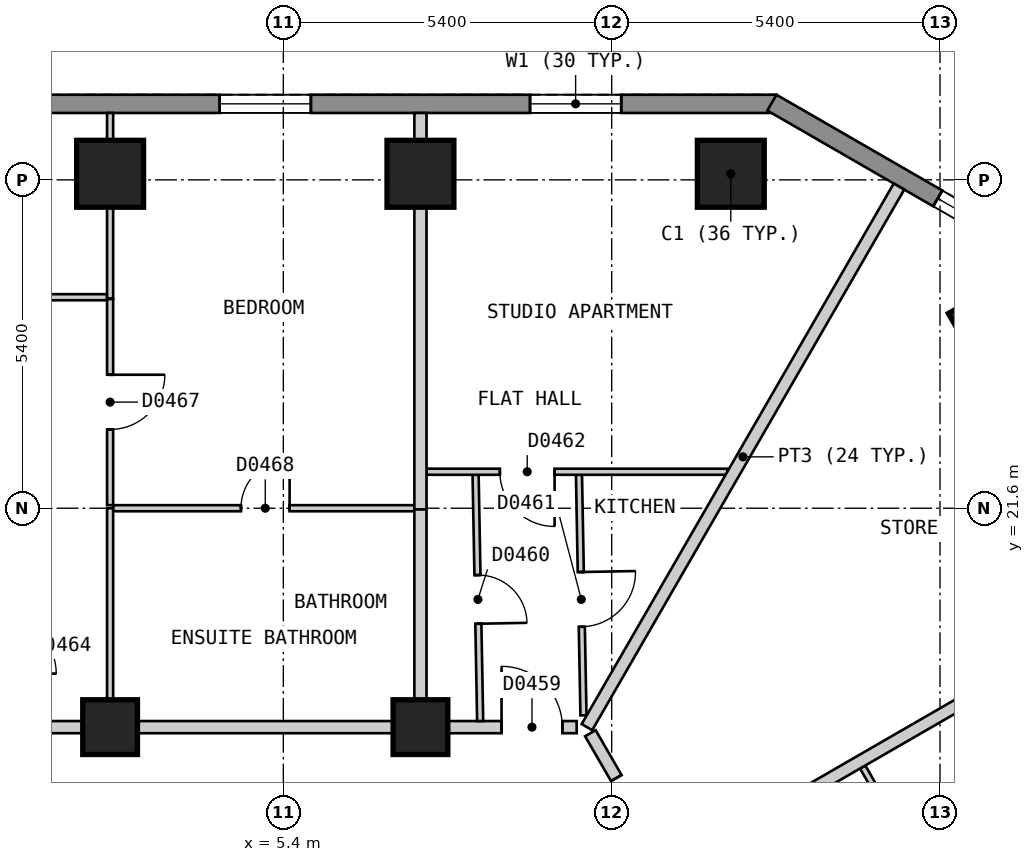
"""IFC4 building model, lengths in metres.
Left out: names, types, materials, properties, quantities, classifications, styles, units other than length and angle.
Written with IfcOpenShell. Run it as: python <this file> out.ifc"""

import sys

from ifc_helpers import new_model, si_unit, direction, frame, frame_2d, origin, origin_2d, place, context, subcontext, project, spatial, polyline, rectangle, outline, extrude, element, fill, save


model = new_model("IFC4")
c1 = context("Model", 3, precision=1e-05, world=origin(), true_north=direction((0.0, 1.0)))
c2 = subcontext(c1, "Body", "Model", "MODEL_VIEW")
j1 = project(units=[si_unit("LENGTHUNIT", "METRE"), si_unit("PLANEANGLEUNIT", "RADIAN")], contexts=[c1])
p1 = place(None, origin())
s1 = spatial("IfcSite", under=j1, at=p1, CompositionType="ELEMENT")
p2 = place(p1, origin())
s2 = spatial("IfcBuilding", under=s1, at=p2, CompositionType="ELEMENT")
p3 = place(p2, frame((0.0, 0.0, 32.4)))
s3 = spatial("IfcBuildingStorey", under=s2, at=p3, CompositionType="ELEMENT", Elevation=32.4)
for number, where, z_axis, x_axis in (
    (1, (12.759, 27.1, 0.0), (0.0, 0.0, 1.0), (-1.0, 0.0, 0.0)),
    (2, (7.655, 27.1, 0.0), (0.0, 0.0, 1.0), (-1.0, 0.0, 0.0)),
    (3, (2.551, 27.1, 0.0), (0.0, 0.0, 1.0), (-1.0, 0.0, 0.0)),
    (4, (17.089, 24.601, 0.0), (0.0, 0.0, 1.0), (-0.5, 0.866, 0.0)),
):
    element("IfcColumn", number, at=place(p3, frame(where, z_axis=z_axis, x_axis=x_axis)), inside=s3, PredefinedType="COLUMN", context=c2, shape_type="SweptSolid", body=[
        extrude(rectangle(XDim=1.1, YDim=1.1, at=origin_2d()), origin(), (0.0, 0.0, 1.0), 3.0),
    ])
for number, where, z_axis, x_axis in (
    (5, (7.655, 18.0, 0.0), (0.0, 0.0, 1.0), (-1.0, 0.0, 0.0)),
    (6, (2.551, 18.0, 0.0), (0.0, 0.0, 1.0), (-1.0, 0.0, 0.0)),
):
    element("IfcColumn", number, at=place(p3, frame(where, z_axis=z_axis, x_axis=x_axis)), inside=s3, PredefinedType="COLUMN", context=c2, shape_type="SweptSolid", body=[
        extrude(rectangle(XDim=0.9, YDim=0.9, at=origin_2d()), origin(), (0.0, 0.0, 1.0), 3.0),
    ])
p4 = place(p3, frame((13.51, 28.25, 0.0), z_axis=(0.0, 0.0, 1.0), x_axis=(-1.0, 0.0, 0.0)))
e7 = element("IfcWall", 7, at=p4, inside=s3, PredefinedType="SOLIDWALL", context=c2, shape_type="SweptSolid", body=[
    extrude(outline(polyline([(0.0, -0.15), (27.02, -0.15), (26.94, 0.15), (0.08, 0.15), (0.0, -0.15)])), origin(), (0.0, 0.0, 1.0), 2.7),
])
p5 = place(p4, frame((2.553, 0.0, 0.15)))
e8 = element("IfcOpeningElement", 8, at=p5, cuts=e7, PredefinedType="OPENING", context=c2, shape_type="SweptSolid", body=[
    extrude(rectangle(XDim=1.5, YDim=2.1, at=frame_2d((0.75, 1.05))), frame((0.0, 0.16, 0.0), z_axis=(0.0, -1.0, 0.0), x_axis=(1.0, 0.0, 0.0)), (0.0, 0.0, 1.0), 0.32),
])
p6 = place(p4, frame((7.657, 0.0, 0.15)))
e9 = element("IfcOpeningElement", 9, at=p6, cuts=e7, PredefinedType="OPENING", context=c2, shape_type="SweptSolid", body=[
    extrude(rectangle(XDim=1.5, YDim=2.1, at=frame_2d((0.75, 1.05))), frame((0.0, 0.16, 0.0), z_axis=(0.0, -1.0, 0.0), x_axis=(1.0, 0.0, 0.0)), (0.0, 0.0, 1.0), 0.32),
])
p7 = place(p4, frame((12.761, 0.0, 0.15)))
e10 = element("IfcOpeningElement", 10, at=p7, cuts=e7, PredefinedType="OPENING", context=c2, shape_type="SweptSolid", body=[
    extrude(rectangle(XDim=1.5, YDim=2.1, at=frame_2d((0.75, 1.05))), frame((0.0, 0.16, 0.0), z_axis=(0.0, -1.0, 0.0), x_axis=(1.0, 0.0, 0.0)), (0.0, 0.0, 1.0), 0.32),
])
p8 = place(p4, frame((17.865, 0.0, 0.15)))
e11 = element("IfcOpeningElement", 11, at=p8, cuts=e7, PredefinedType="OPENING", context=c2, shape_type="SweptSolid", body=[
    extrude(rectangle(XDim=1.5, YDim=2.1, at=frame_2d((0.75, 1.05))), frame((0.0, 0.16, 0.0), z_axis=(0.0, -1.0, 0.0), x_axis=(1.0, 0.0, 0.0)), (0.0, 0.0, 1.0), 0.32),
])
p9 = place(p4, frame((22.969, 0.0, 0.15)))
e12 = element("IfcOpeningElement", 12, at=p9, cuts=e7, PredefinedType="OPENING", context=c2, shape_type="SweptSolid", body=[
    extrude(rectangle(XDim=1.5, YDim=2.1, at=frame_2d((0.75, 1.05))), frame((0.0, 0.16, 0.0), z_axis=(0.0, -1.0, 0.0), x_axis=(1.0, 0.0, 0.0)), (0.0, 0.0, 1.0), 0.32),
])
p10 = place(p3, frame((17.765, 25.77, 0.0), z_axis=(0.0, 0.0, 1.0), x_axis=(-0.866010750942, 0.50002537861, 0.0)))
e13 = element("IfcWall", 13, at=p10, inside=s3, PredefinedType="SOLIDWALL", context=c2, shape_type="SweptSolid", body=[
    extrude(outline(polyline([(0.0, -0.15), (5.0, -0.15), (4.919, 0.15), (0.08, 0.15), (0.0, -0.15)])), origin(), (0.0, 0.0, 1.0), 2.7),
])
p11 = place(p10, frame((0.65, 0.0, 0.15)))
e14 = element("IfcOpeningElement", 14, at=p11, cuts=e13, PredefinedType="OPENING", context=c2, shape_type="SweptSolid", body=[
    extrude(rectangle(XDim=1.2, YDim=2.1, at=frame_2d((0.6, 1.05))), frame((0.0, 0.16, 0.0), z_axis=(0.0, -1.0, 0.0), x_axis=(1.0, 0.0, 0.0)), (0.0, 0.0, 1.0), 0.32),
])
p12 = place(p3, frame((10.45, 17.9, 0.0), z_axis=(0.0, 0.0, 1.0), x_axis=(0.500034352617, -0.866005569383, 0.0)))
e15 = element("IfcWall", 15, at=p12, inside=s3, PredefinedType="PARTITIONING", context=c2, shape_type="SweptSolid", body=[
    extrude(rectangle(XDim=20.553, YDim=0.2, at=frame_2d((10.276, 0.0))), origin(), (0.0, 0.0, 1.0), 2.7),
])
p13 = place(p12, frame((9.775, 0.0, 0.0)))
e16 = element("IfcOpeningElement", 16, at=p13, cuts=e15, PredefinedType="OPENING", context=c2, shape_type="SweptSolid", body=[
    extrude(rectangle(XDim=1.0, YDim=2.1, at=frame_2d((0.5, 1.05))), frame((0.0, 0.11, 0.0), z_axis=(0.0, -1.0, 0.0), x_axis=(1.0, 0.0, 0.0)), (0.0, 0.0, 1.0), 0.22),
])
p14 = place(p12, frame((0.852, 0.0, 0.0)))
e17 = element("IfcOpeningElement", 17, at=p14, cuts=e15, PredefinedType="OPENING", context=c2, shape_type="SweptSolid", body=[
    extrude(rectangle(XDim=0.8, YDim=2.1, at=frame_2d((0.4, 1.05))), frame((0.0, 0.11, 0.0), z_axis=(0.0, -1.0, 0.0), x_axis=(1.0, 0.0, 0.0)), (0.0, 0.0, 1.0), 0.22),
])
p15 = place(p3, frame((-10.276, 18.0, 0.0), z_axis=(0.0, 0.0, 1.0), x_axis=(1.0, 0.0, 0.0)))
e18 = element("IfcWall", 18, at=p15, inside=s3, PredefinedType="PARTITIONING", context=c2, shape_type="SweptSolid", body=[
    extrude(rectangle(XDim=20.5, YDim=0.2, at=frame_2d((10.25, 0.0))), origin(), (0.0, 0.0, 1.0), 2.7),
])
p16 = place(p15, frame((19.265, 0.0, 0.0)))
e19 = element("IfcOpeningElement", 19, at=p16, cuts=e18, PredefinedType="OPENING", context=c2, shape_type="SweptSolid", body=[
    extrude(rectangle(XDim=1.0, YDim=2.1, at=frame_2d((0.5, 1.05))), frame((0.0, 0.11, 0.0), z_axis=(0.0, -1.0, 0.0), x_axis=(1.0, 0.0, 0.0)), (0.0, 0.0, 1.0), 0.22),
])
p17 = place(p15, frame((9.775, 0.0, 0.0)))
e20 = element("IfcOpeningElement", 20, at=p17, cuts=e18, PredefinedType="OPENING", context=c2, shape_type="SweptSolid", body=[
    extrude(rectangle(XDim=1.0, YDim=2.1, at=frame_2d((0.5, 1.05))), frame((0.0, 0.11, 0.0), z_axis=(0.0, -1.0, 0.0), x_axis=(1.0, 0.0, 0.0)), (0.0, 0.0, 1.0), 0.22),
])
p18 = place(p15, frame((4.671, 0.0, 0.0)))
e21 = element("IfcOpeningElement", 21, at=p18, cuts=e18, PredefinedType="OPENING", context=c2, shape_type="SweptSolid", body=[
    extrude(rectangle(XDim=1.0, YDim=2.1, at=frame_2d((0.5, 1.05))), frame((0.0, 0.11, 0.0), z_axis=(0.0, -1.0, 0.0), x_axis=(1.0, 0.0, 0.0)), (0.0, 0.0, 1.0), 0.22),
])
p19 = place(p3, frame((14.928, 17.344, 0.0), z_axis=(0.0, 0.0, 1.0), x_axis=(0.500029609304, -0.86600830817, 0.0)))
e22 = element("IfcWall", 22, at=p19, inside=s3, PredefinedType="PARTITIONING", context=c2, shape_type="SweptSolid", body=[
    extrude(rectangle(XDim=4.954, YDim=0.1, at=frame_2d((2.477, 0.0))), origin(), (0.0, 0.0, 1.0), 2.7),
])
p20 = place(p19, frame((2.052, 0.0, 0.0)))
e23 = element("IfcOpeningElement", 23, at=p20, cuts=e22, PredefinedType="OPENING", context=c2, shape_type="SweptSolid", body=[
    extrude(rectangle(XDim=0.8, YDim=2.1, at=frame_2d((0.4, 1.05))), frame((0.0, 0.06, 0.0), z_axis=(0.0, -1.0, 0.0), x_axis=(1.0, 0.0, 0.0)), (0.0, 0.0, 1.0), 0.12),
])
p21 = place(p3, frame((8.562, 22.15, 0.0), z_axis=(0.0, 0.0, 1.0), x_axis=(0.018504185939, -0.999828782894, 0.0)))
e24 = element("IfcWall", 24, at=p21, inside=s3, PredefinedType="PARTITIONING", context=c2, shape_type="SweptSolid", body=[
    extrude(rectangle(XDim=4.051, YDim=0.1, at=frame_2d((2.025, 0.0))), origin(), (0.0, 0.0, 1.0), 2.7),
])
p22 = place(p21, frame((1.65, 0.0, 0.0)))
e25 = element("IfcOpeningElement", 25, at=p22, cuts=e24, PredefinedType="OPENING", context=c2, shape_type="SweptSolid", body=[
    extrude(rectangle(XDim=0.8, YDim=2.1, at=frame_2d((0.4, 1.05))), frame((0.0, 0.06, 0.0), z_axis=(0.0, -1.0, 0.0), x_axis=(1.0, 0.0, 0.0)), (0.0, 0.0, 1.0), 0.12),
])
p23 = place(p3, frame((10.262, 22.15, 0.0), z_axis=(0.0, 0.0, 1.0), x_axis=(0.018696971826, -0.999825196344, 0.0)))
e26 = element("IfcWall", 26, at=p23, inside=s3, PredefinedType="PARTITIONING", context=c2, shape_type="SweptSolid", body=[
    extrude(rectangle(XDim=3.957, YDim=0.1, at=frame_2d((1.978, 0.0))), origin(), (0.0, 0.0, 1.0), 2.7),
])
p24 = place(p23, frame((1.6, 0.0, 0.0)))
e27 = element("IfcOpeningElement", 27, at=p24, cuts=e26, PredefinedType="OPENING", context=c2, shape_type="SweptSolid", body=[
    extrude(rectangle(XDim=0.9, YDim=2.1, at=frame_2d((0.45, 1.05))), frame((0.0, 0.06, 0.0), z_axis=(0.0, -1.0, 0.0), x_axis=(1.0, 0.0, 0.0)), (0.0, 0.0, 1.0), 0.12),
])
p25 = place(p3, frame((2.551, 25.04, 0.0), z_axis=(0.0, 0.0, 1.0), x_axis=(0.0, -1.0, 0.0)))
e28 = element("IfcWall", 28, at=p25, inside=s3, PredefinedType="PARTITIONING", context=c2, shape_type="SweptSolid", body=[
    extrude(rectangle(XDim=3.39, YDim=0.1, at=frame_2d((1.695, 0.0))), origin(), (0.0, 0.0, 1.0), 2.7),
])
p26 = place(p25, frame((1.245, 0.0, 0.0)))
e29 = element("IfcOpeningElement", 29, at=p26, cuts=e28, PredefinedType="OPENING", context=c2, shape_type="SweptSolid", body=[
    extrude(rectangle(XDim=0.9, YDim=2.1, at=frame_2d((0.45, 1.05))), frame((0.0, 0.06, 0.0), z_axis=(0.0, -1.0, 0.0), x_axis=(1.0, 0.0, 0.0)), (0.0, 0.0, 1.0), 0.12),
])
p27 = place(p3, frame((2.601, 21.6, 0.0), z_axis=(0.0, 0.0, 1.0), x_axis=(1.0, 0.0, 0.0)))
e30 = element("IfcWall", 30, at=p27, inside=s3, PredefinedType="PARTITIONING", context=c2, shape_type="SweptSolid", body=[
    extrude(rectangle(XDim=4.954, YDim=0.1, at=frame_2d((2.477, 0.0))), origin(), (0.0, 0.0, 1.0), 2.7),
])
p28 = place(p27, frame((2.102, 0.0, 0.0)))
e31 = element("IfcOpeningElement", 31, at=p28, cuts=e30, PredefinedType="OPENING", context=c2, shape_type="SweptSolid", body=[
    extrude(rectangle(XDim=0.8, YDim=2.1, at=frame_2d((0.4, 1.05))), frame((0.0, 0.06, 0.0), z_axis=(0.0, -1.0, 0.0), x_axis=(1.0, 0.0, 0.0)), (0.0, 0.0, 1.0), 0.12),
])
p29 = place(p3, frame((7.755, 22.2, 0.0), z_axis=(0.0, 0.0, 1.0), x_axis=(1.0, 0.0, 0.0)))
e32 = element("IfcWall", 32, at=p29, inside=s3, PredefinedType="PARTITIONING", context=c2, shape_type="SweptSolid", body=[
    extrude(rectangle(XDim=4.947, YDim=0.1, at=frame_2d((2.474, 0.0))), origin(), (0.0, 0.0, 1.0), 2.7),
])
p30 = place(p29, frame((1.206, 0.0, 0.0)))
e33 = element("IfcOpeningElement", 33, at=p30, cuts=e32, PredefinedType="OPENING", context=c2, shape_type="SweptSolid", body=[
    extrude(rectangle(XDim=0.9, YDim=2.1, at=frame_2d((0.45, 1.05))), frame((0.0, 0.06, 0.0), z_axis=(0.0, -1.0, 0.0), x_axis=(1.0, 0.0, 0.0)), (0.0, 0.0, 1.0), 0.12),
])
p31 = place(p3, frame((-2.453, 25.07, 0.0), z_axis=(0.0, 0.0, 1.0), x_axis=(1.0, 0.0, 0.0)))
e34 = element("IfcWall", 34, at=p31, inside=s3, PredefinedType="PARTITIONING", context=c2, shape_type="SweptSolid", body=[
    extrude(rectangle(XDim=4.954, YDim=0.1, at=frame_2d((2.477, 0.0))), origin(), (0.0, 0.0, 1.0), 2.7),
])
p32 = place(p31, frame((2.002, 0.0, 0.0)))
e35 = element("IfcOpeningElement", 35, at=p32, cuts=e34, PredefinedType="OPENING", context=c2, shape_type="SweptSolid", body=[
    extrude(rectangle(XDim=0.9, YDim=2.1, at=frame_2d((0.45, 1.05))), frame((0.0, 0.06, 0.0), z_axis=(0.0, -1.0, 0.0), x_axis=(1.0, 0.0, 0.0)), (0.0, 0.0, 1.0), 0.12),
])
p33 = place(p3, frame((2.551, 18.1, 0.0), z_axis=(0.0, 0.0, 1.0), x_axis=(0.0, 1.0, 0.0)))
e36 = element("IfcWall", 36, at=p33, inside=s3, PredefinedType="PARTITIONING", context=c2, shape_type="SweptSolid", body=[
    extrude(rectangle(XDim=3.5, YDim=0.1, at=frame_2d((1.75, 0.0))), origin(), (0.0, 0.0, 1.0), 2.7),
])
p34 = place(p3, frame((2.551, 25.05, 0.0), z_axis=(0.0, 0.0, 1.0), x_axis=(0.0, 1.0, 0.0)))
e37 = element("IfcWall", 37, at=p34, inside=s3, PredefinedType="PARTITIONING", context=c2, shape_type="SweptSolid", body=[
    extrude(rectangle(XDim=3.05, YDim=0.1, at=frame_2d((1.525, 0.0))), origin(), (0.0, 0.0, 1.0), 2.7),
])
p35 = place(p3, frame((7.655, 21.62, 0.0), z_axis=(0.0, 0.0, 1.0), x_axis=(0.0, -1.0, 0.0)))
e38 = element("IfcWall", 38, at=p35, inside=s3, PredefinedType="PARTITIONING", context=c2, shape_type="SweptSolid", body=[
    extrude(rectangle(XDim=3.52, YDim=0.2, at=frame_2d((1.76, 0.0))), origin(), (0.0, 0.0, 1.0), 2.7),
])
p36 = place(p3, frame((10.393, 18.0, 0.0), z_axis=(0.0, 0.0, 1.0), x_axis=(0.499945497007, 0.866056868816, 0.0)))
e39 = element("IfcWall", 39, at=p36, inside=s3, PredefinedType="PARTITIONING", context=c2, shape_type="SweptSolid", body=[
    extrude(rectangle(XDim=10.265, YDim=0.2, at=frame_2d((5.132, 0.0))), origin(), (0.0, 0.0, 1.0), 2.7),
])
p37 = place(p3, frame((7.655, 21.58, 0.0), z_axis=(0.0, 0.0, 1.0), x_axis=(0.0, 1.0, 0.0)))
e40 = element("IfcWall", 40, at=p37, inside=s3, PredefinedType="PARTITIONING", context=c2, shape_type="SweptSolid", body=[
    extrude(rectangle(XDim=6.52, YDim=0.2, at=frame_2d((3.26, 0.0))), origin(), (0.0, 0.0, 1.0), 2.7),
])
p38 = place(p3, frame((11.847, 15.681, 0.0), z_axis=(0.0, 0.0, 1.0), x_axis=(0.866022959057, 0.500004234368, 0.0)))
e41 = element("IfcWall", 41, at=p38, inside=s3, PredefinedType="PARTITIONING", context=c2, shape_type="SweptSolid", body=[
    extrude(rectangle(XDim=10.0, YDim=0.2, at=frame_2d((5.0, 0.0))), origin(), (0.0, 0.0, 1.0), 2.7),
])
p39 = place(p5, origin())
e42 = element("IfcWindow", 42, at=p39, inside=s3, PartitioningType="SINGLE_PANEL", PredefinedType="WINDOW", context=c2, shape_type="SweptSolid", body=[
    extrude(rectangle(XDim=1.5, YDim=2.1, at=frame_2d((0.75, 1.05))), frame((0.0, 0.03, 0.0), z_axis=(0.0, -1.0, 0.0), x_axis=(1.0, 0.0, 0.0)), (0.0, 0.0, 1.0), 0.06),
])
fill(e8, e42)
p40 = place(p6, origin())
e43 = element("IfcWindow", 43, at=p40, inside=s3, PartitioningType="SINGLE_PANEL", PredefinedType="WINDOW", context=c2, shape_type="SweptSolid", body=[
    extrude(rectangle(XDim=1.5, YDim=2.1, at=frame_2d((0.75, 1.05))), frame((0.0, 0.03, 0.0), z_axis=(0.0, -1.0, 0.0), x_axis=(1.0, 0.0, 0.0)), (0.0, 0.0, 1.0), 0.06),
])
fill(e9, e43)
p41 = place(p11, origin())
e44 = element("IfcWindow", 44, at=p41, inside=s3, PartitioningType="SINGLE_PANEL", PredefinedType="WINDOW", context=c2, shape_type="SweptSolid", body=[
    extrude(rectangle(XDim=1.2, YDim=2.1, at=frame_2d((0.6, 1.05))), frame((0.0, 0.03, 0.0), z_axis=(0.0, -1.0, 0.0), x_axis=(1.0, 0.0, 0.0)), (0.0, 0.0, 1.0), 0.06),
])
fill(e14, e44)
p42 = place(p14, origin())
e45 = element("IfcDoor", 45, at=p42, inside=s3, OperationType="SINGLE_SWING_RIGHT", PredefinedType="DOOR", context=c2, shape_type="SweptSolid", body=[
    extrude(rectangle(XDim=0.8, YDim=2.1, at=frame_2d((0.4, 1.05))), frame((0.0, 0.025, 0.0), z_axis=(0.0, -1.0, 0.0), x_axis=(1.0, 0.0, 0.0)), (0.0, 0.0, 1.0), 0.05),
])
fill(e17, e45)
p43 = place(p16, origin())
e46 = element("IfcDoor", 46, at=p43, inside=s3, OperationType="SINGLE_SWING_LEFT", PredefinedType="DOOR", context=c2, shape_type="SweptSolid", body=[
    extrude(rectangle(XDim=1.0, YDim=2.1, at=frame_2d((0.5, 1.05))), frame((0.0, 0.025, 0.0), z_axis=(0.0, -1.0, 0.0), x_axis=(1.0, 0.0, 0.0)), (0.0, 0.0, 1.0), 0.05),
])
fill(e19, e46)
p44 = place(p22, origin())
e47 = element("IfcDoor", 47, at=p44, inside=s3, OperationType="SINGLE_SWING_RIGHT", PredefinedType="DOOR", context=c2, shape_type="SweptSolid", body=[
    extrude(rectangle(XDim=0.8, YDim=2.1, at=frame_2d((0.4, 1.05))), frame((0.0, 0.025, 0.0), z_axis=(0.0, -1.0, 0.0), x_axis=(1.0, 0.0, 0.0)), (0.0, 0.0, 1.0), 0.05),
])
fill(e25, e47)
p45 = place(p24, origin())
e48 = element("IfcDoor", 48, at=p45, inside=s3, OperationType="SINGLE_SWING_LEFT", PredefinedType="DOOR", context=c2, shape_type="SweptSolid", body=[
    extrude(rectangle(XDim=0.9, YDim=2.1, at=frame_2d((0.45, 1.05))), frame((0.0, 0.025, 0.0), z_axis=(0.0, -1.0, 0.0), x_axis=(1.0, 0.0, 0.0)), (0.0, 0.0, 1.0), 0.05),
])
fill(e27, e48)
p46 = place(p30, origin())
e49 = element("IfcDoor", 49, at=p46, inside=s3, OperationType="SINGLE_SWING_RIGHT", PredefinedType="DOOR", context=c2, shape_type="SweptSolid", body=[
    extrude(rectangle(XDim=0.9, YDim=2.1, at=frame_2d((0.45, 1.05))), frame((0.0, 0.025, 0.0), z_axis=(0.0, -1.0, 0.0), x_axis=(1.0, 0.0, 0.0)), (0.0, 0.0, 1.0), 0.05),
])
fill(e33, e49)
p47 = place(p26, origin())
e50 = element("IfcDoor", 50, at=p47, inside=s3, OperationType="SINGLE_SWING_LEFT", PredefinedType="DOOR", context=c2, shape_type="SweptSolid", body=[
    extrude(rectangle(XDim=0.9, YDim=2.1, at=frame_2d((0.45, 1.05))), frame((0.0, 0.025, 0.0), z_axis=(0.0, -1.0, 0.0), x_axis=(1.0, 0.0, 0.0)), (0.0, 0.0, 1.0), 0.05),
])
fill(e29, e50)
p48 = place(p28, origin())
e51 = element("IfcDoor", 51, at=p48, inside=s3, OperationType="SINGLE_SWING_RIGHT", PredefinedType="DOOR", context=c2, shape_type="SweptSolid", body=[
    extrude(rectangle(XDim=0.8, YDim=2.1, at=frame_2d((0.4, 1.05))), frame((0.0, 0.025, 0.0), z_axis=(0.0, -1.0, 0.0), x_axis=(1.0, 0.0, 0.0)), (0.0, 0.0, 1.0), 0.05),
])
fill(e31, e51)
save(model, sys.argv[1])
